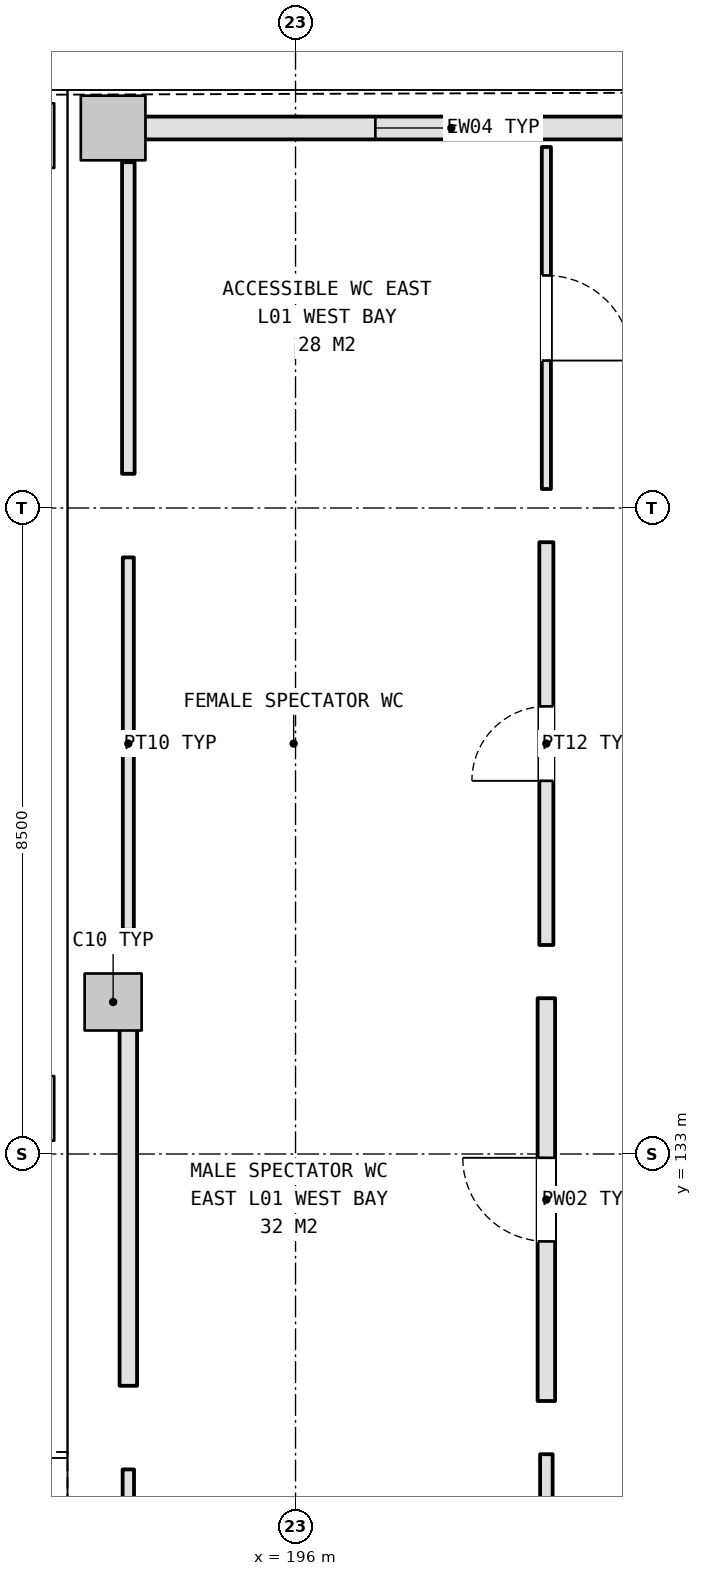
"""IFC4 building model, lengths in metres.
Left out: names, types, materials, properties, quantities, classifications, styles, units other than length and angle.
Written with IfcOpenShell. Run it as: python <this file> out.ifc"""

import sys

from ifc_helpers import new_model, si_unit, direction, frame, frame_2d, origin, origin_2d, place, context, subcontext, project, spatial, rectangle, extrude, element, fill, save


model = new_model("IFC4")
c1 = context("Model", 3, precision=1e-05, world=origin(), true_north=direction((0.0, 1.0)))
c2 = subcontext(c1, "Body", "Model", "MODEL_VIEW")
j1 = project(units=[si_unit("LENGTHUNIT", "METRE"), si_unit("PLANEANGLEUNIT", "RADIAN")], contexts=[c1])
p1 = place(None, origin())
s1 = spatial("IfcSite", under=j1, at=p1, CompositionType="ELEMENT")
p2 = place(p1, origin())
s2 = spatial("IfcBuilding", under=s1, at=p2, CompositionType="ELEMENT")
p3 = place(p2, frame((0.0, 0.0, 5.4)))
s3 = spatial("IfcBuildingStorey", under=s2, at=p3, CompositionType="ELEMENT", Elevation=5.4)
p4 = place(p3, frame((193.6, 135.0, 0.0), z_axis=(0.0, 0.0, 1.0), x_axis=(1.0, 0.0, 0.0)))
e1 = element("IfcColumn", 1, at=p4, inside=s3, PredefinedType="COLUMN", context=c2, shape_type="SweptSolid", body=[
    extrude(rectangle(XDim=0.75, YDim=0.75, at=origin_2d()), origin(), (0.0, 0.0, 1.0), 5.4),
])
for number, where, z_axis, x_axis in (
    (2, (193.6, 146.5, 0.0), (0.0, 0.0, 1.0), (1.0, 0.0, 0.0)),
    (3, (192.4, 133.6, 0.0), (0.0, 0.0, 1.0), (1.0, 0.0, 0.0)),
    (4, (192.4, 146.4, 0.0), (0.0, 0.0, 1.0), (1.0, 0.0, 0.0)),
):
    element("IfcColumn", number, at=place(p3, frame(where, z_axis=z_axis, x_axis=x_axis)), inside=s3, PredefinedType="COLUMN", context=c2, shape_type="SweptSolid", body=[
        extrude(rectangle(XDim=0.85, YDim=0.85, at=origin_2d()), origin(), (0.0, 0.0, 1.0), 5.4),
    ])
p5 = place(p3, frame((194.013, 146.5, 0.0), z_axis=(0.0, 0.0, 1.0), x_axis=(1.0, 0.0, 0.0)))
e5 = element("IfcWall", 5, at=p5, inside=s3, PredefinedType="SOLIDWALL", context=c2, shape_type="SweptSolid", body=[
    extrude(rectangle(XDim=8.074, YDim=0.3, at=frame_2d((4.037, 0.0))), origin(), (0.0, 0.0, 1.0), 4.525),
])
p6 = place(p5, frame((3.037, 0.0, 1.05)))
e6 = element("IfcOpeningElement", 6, at=p6, cuts=e5, PredefinedType="OPENING", context=c2, shape_type="SweptSolid", body=[
    extrude(rectangle(XDim=2.0, YDim=1.7, at=frame_2d((1.0, 0.85))), frame((0.0, 0.16, 0.0), z_axis=(0.0, -1.0, 0.0), x_axis=(1.0, 0.0, 0.0)), (0.0, 0.0, 1.0), 0.32),
])
p7 = place(p3, frame((199.3, 129.05, 0.0), z_axis=(0.0, 0.0, 1.0), x_axis=(0.0, -1.0, 0.0)))
e7 = element("IfcWall", 7, at=p7, inside=s3, PredefinedType="PARTITIONING", context=c2, shape_type="SweptSolid", body=[
    extrude(rectangle(XDim=9.3, YDim=0.165, at=frame_2d((4.65, 0.0))), origin(), (0.0, 0.0, 1.0), 4.625),
])
p8 = place(p7, frame((4.075, 0.0, 0.0)))
e8 = element("IfcOpeningElement", 8, at=p8, cuts=e7, PredefinedType="OPENING", context=c2, shape_type="SweptSolid", body=[
    extrude(rectangle(XDim=1.15, YDim=2.2, at=frame_2d((0.575, 1.1))), frame((0.0, 0.093, 0.0), z_axis=(0.0, -1.0, 0.0), x_axis=(1.0, 0.0, 0.0)), (0.0, 0.0, 1.0), 0.185),
])
p9 = place(p3, frame((193.8, 119.95, 0.0), z_axis=(0.0, 0.0, 1.0), x_axis=(0.0, 1.0, 0.0)))
e9 = element("IfcWall", 9, at=p9, inside=s3, PredefinedType="PARTITIONING", context=c2, shape_type="SweptSolid", body=[
    extrude(rectangle(XDim=8.9, YDim=0.15, at=frame_2d((4.45, 0.0))), origin(), (0.0, 0.0, 1.0), 4.475),
])
p10 = place(p3, frame((199.3, 135.05, 0.0), z_axis=(0.0, 0.0, 1.0), x_axis=(0.0, -1.0, 0.0)))
e10 = element("IfcWall", 10, at=p10, inside=s3, PredefinedType="PLUMBINGWALL", context=c2, shape_type="SweptSolid", body=[
    extrude(rectangle(XDim=5.3, YDim=0.23, at=frame_2d((2.65, 0.0))), origin(), (0.0, 0.0, 1.0), 4.715),
])
p11 = place(p10, frame((2.1, 0.0, 0.0)))
e11 = element("IfcOpeningElement", 11, at=p11, cuts=e10, PredefinedType="OPENING", context=c2, shape_type="SweptSolid", body=[
    extrude(rectangle(XDim=1.1, YDim=2.15, at=frame_2d((0.55, 1.075))), frame((0.0, 0.125, 0.0), z_axis=(0.0, -1.0, 0.0), x_axis=(1.0, 0.0, 0.0)), (0.0, 0.0, 1.0), 0.25),
])
p12 = place(p3, frame((193.8, 129.95, 0.0), z_axis=(0.0, 0.0, 1.0), x_axis=(0.0, 1.0, 0.0)))
e12 = element("IfcWall", 12, at=p12, inside=s3, PredefinedType="PLUMBINGWALL", context=c2, shape_type="SweptSolid", body=[
    extrude(rectangle(XDim=4.9, YDim=0.23, at=frame_2d((2.45, 0.0))), origin(), (0.0, 0.0, 1.0), 4.475),
])
p13 = place(p3, frame((199.3, 141.05, 0.0), z_axis=(0.0, 0.0, 1.0), x_axis=(0.0, -1.0, 0.0)))
e13 = element("IfcWall", 13, at=p13, inside=s3, PredefinedType="PARTITIONING", context=c2, shape_type="SweptSolid", body=[
    extrude(rectangle(XDim=5.3, YDim=0.185, at=frame_2d((2.65, 0.0))), origin(), (0.0, 0.0, 1.0), 4.625),
])
p14 = place(p13, frame((2.16, 0.0, 0.0)))
e14 = element("IfcOpeningElement", 14, at=p14, cuts=e13, PredefinedType="OPENING", context=c2, shape_type="SweptSolid", body=[
    extrude(rectangle(XDim=0.98, YDim=2.15, at=frame_2d((0.49, 1.075))), frame((0.0, 0.103, 0.0), z_axis=(0.0, -1.0, 0.0), x_axis=(1.0, 0.0, 0.0)), (0.0, 0.0, 1.0), 0.205),
])
p15 = place(p3, frame((193.8, 135.95, 0.0), z_axis=(0.0, 0.0, 1.0), x_axis=(0.0, 1.0, 0.0)))
e15 = element("IfcWall", 15, at=p15, inside=s3, PredefinedType="PARTITIONING", context=c2, shape_type="SweptSolid", body=[
    extrude(rectangle(XDim=4.9, YDim=0.145, at=frame_2d((2.45, 0.0))), origin(), (0.0, 0.0, 1.0), 4.475),
])
p16 = place(p3, frame((199.3, 146.25, 0.0), z_axis=(0.0, 0.0, 1.0), x_axis=(0.0, -1.0, 0.0)))
e16 = element("IfcWall", 16, at=p16, inside=s3, PredefinedType="PARTITIONING", context=c2, shape_type="SweptSolid", body=[
    extrude(rectangle(XDim=4.5, YDim=0.12, at=frame_2d((2.25, 0.0))), origin(), (0.0, 0.0, 1.0), 5.12),
])
p17 = place(p16, frame((1.69, 0.0, 0.0)))
e17 = element("IfcOpeningElement", 17, at=p17, cuts=e16, PredefinedType="OPENING", context=c2, shape_type="SweptSolid", body=[
    extrude(rectangle(XDim=1.12, YDim=2.2, at=frame_2d((0.56, 1.1))), frame((0.0, 0.07, 0.0), z_axis=(0.0, -1.0, 0.0), x_axis=(1.0, 0.0, 0.0)), (0.0, 0.0, 1.0), 0.14),
])
p18 = place(p3, frame((193.8, 141.95, 0.0), z_axis=(0.0, 0.0, 1.0), x_axis=(0.0, 1.0, 0.0)))
e18 = element("IfcWall", 18, at=p18, inside=s3, PredefinedType="PARTITIONING", context=c2, shape_type="SweptSolid", body=[
    extrude(rectangle(XDim=4.1, YDim=0.165, at=frame_2d((2.05, 0.0))), origin(), (0.0, 0.0, 1.0), 4.475),
])
p19 = place(p6, origin())
e19 = element("IfcWindow", 19, at=p19, inside=s3, PartitioningType="SINGLE_PANEL", PredefinedType="WINDOW", context=c2, shape_type="SweptSolid", body=[
    extrude(rectangle(XDim=2.0, YDim=1.7, at=frame_2d((1.0, 0.85))), frame((0.0, 0.03, 0.0), z_axis=(0.0, -1.0, 0.0), x_axis=(1.0, 0.0, 0.0)), (0.0, 0.0, 1.0), 0.06),
])
fill(e6, e19)
p20 = place(p11, frame((1.1, 0.0, 0.0), z_axis=(0.0, 0.0, 1.0), x_axis=(-1.0, 0.0, 0.0)))
e20 = element("IfcDoor", 20, at=p20, inside=s3, OperationType="SINGLE_SWING_LEFT", PredefinedType="DOOR", context=c2, shape_type="SweptSolid", body=[
    extrude(rectangle(XDim=1.1, YDim=2.15, at=frame_2d((0.55, 1.075))), frame((0.0, 0.025, 0.0), z_axis=(0.0, -1.0, 0.0), x_axis=(1.0, 0.0, 0.0)), (0.0, 0.0, 1.0), 0.05),
])
fill(e11, e20)
p21 = place(p14, frame((0.98, 0.0, 0.0), z_axis=(0.0, 0.0, 1.0), x_axis=(-1.0, 0.0, 0.0)))
e21 = element("IfcDoor", 21, at=p21, inside=s3, OperationType="SINGLE_SWING_RIGHT", PredefinedType="DOOR", context=c2, shape_type="SweptSolid", body=[
    extrude(rectangle(XDim=0.98, YDim=2.15, at=frame_2d((0.49, 1.075))), frame((0.0, 0.025, 0.0), z_axis=(0.0, -1.0, 0.0), x_axis=(1.0, 0.0, 0.0)), (0.0, 0.0, 1.0), 0.05),
])
fill(e14, e21)
p22 = place(p17, origin())
e22 = element("IfcDoor", 22, at=p22, inside=s3, OperationType="SINGLE_SWING_RIGHT", PredefinedType="DOOR", context=c2, shape_type="SweptSolid", body=[
    extrude(rectangle(XDim=1.12, YDim=2.2, at=frame_2d((0.56, 1.1))), frame((0.0, 0.025, 0.0), z_axis=(0.0, -1.0, 0.0), x_axis=(1.0, 0.0, 0.0)), (0.0, 0.0, 1.0), 0.05),
])
fill(e17, e22)
save(model, sys.argv[1])
